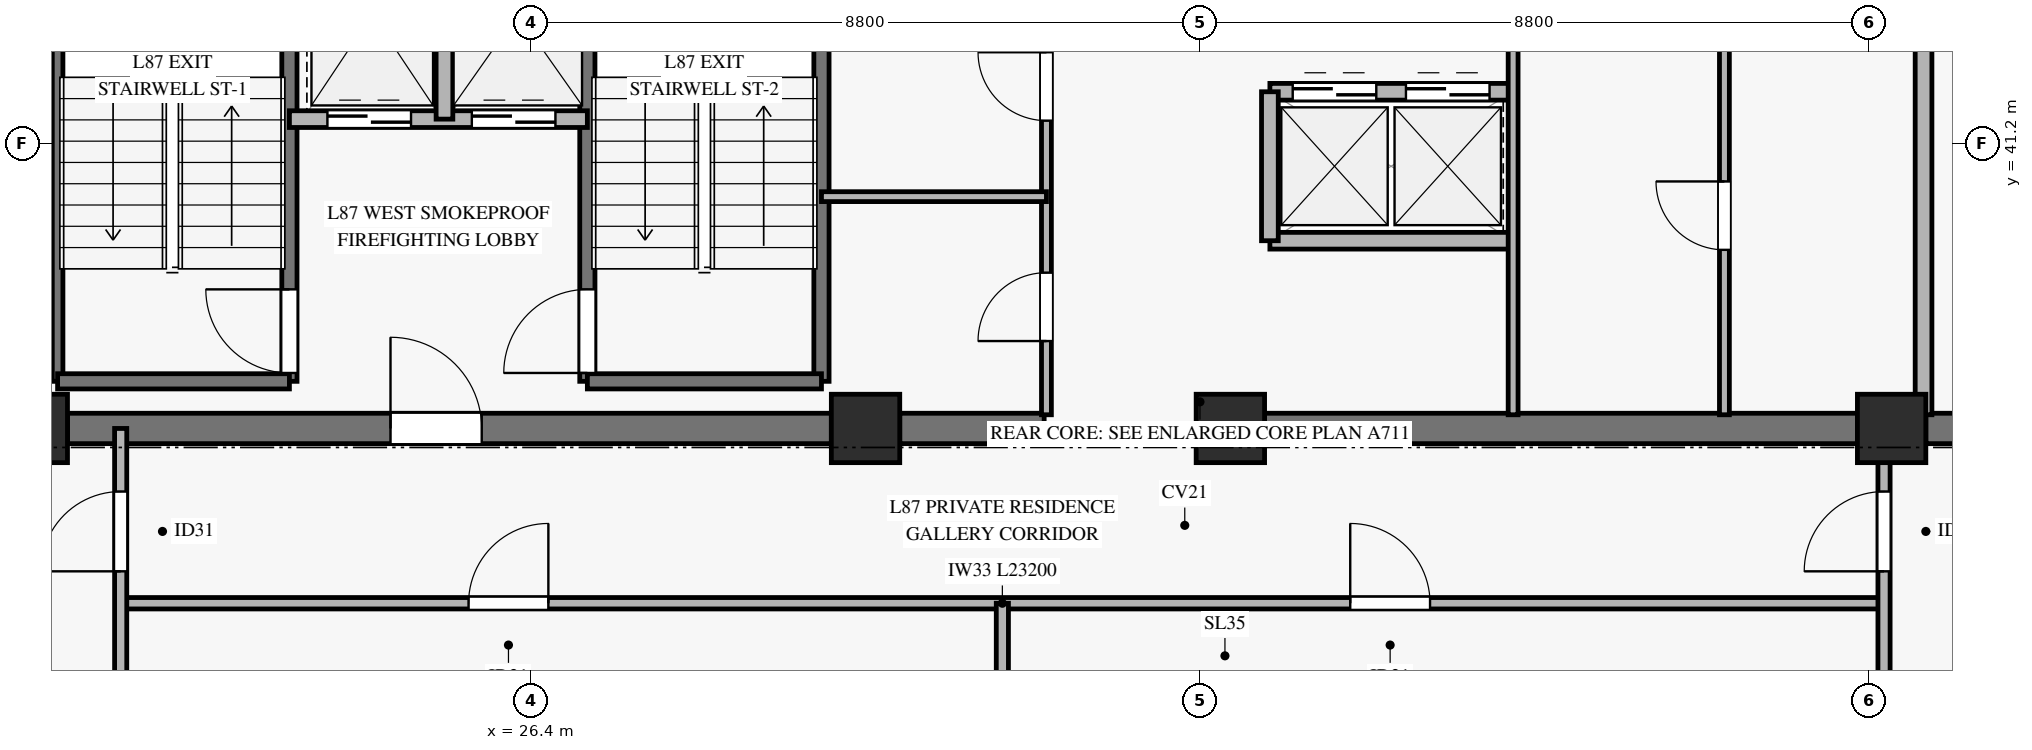
"""IFC4 building model, lengths in metres.
Left out: names, types, materials, properties, quantities, classifications, styles, units other than length and angle.
Written with IfcOpenShell. Run it as: python <this file> out.ifc"""

import sys

from ifc_helpers import new_model, si_unit, direction, frame, frame_2d, origin, origin_2d, place, context, subcontext, project, spatial, rectangle, extrude, source, transform, mapped, element, fill, save


model = new_model("IFC4")
c1 = context("Model", 3, precision=1e-05, world=origin(), true_north=direction((0.0, 1.0)))
c2 = subcontext(c1, "Body", "Model", "MODEL_VIEW")
j1 = project(units=[si_unit("LENGTHUNIT", "METRE"), si_unit("PLANEANGLEUNIT", "RADIAN")], contexts=[c1])
p1 = place(None, origin())
s1 = spatial("IfcSite", under=j1, at=p1, CompositionType="ELEMENT")
p2 = place(p1, origin())
s2 = spatial("IfcBuilding", under=s1, at=p2, CompositionType="ELEMENT")
p3 = place(p2, frame((0.0, 0.0, 335.7)))
s3 = spatial("IfcBuildingStorey", under=s2, at=p3, CompositionType="ELEMENT", Elevation=335.7)
m1 = source(origin(), c2, "Body", "SweptSolid", [
    extrude(rectangle(XDim=0.9, YDim=0.9, at=origin_2d()), origin(), (0.0, 0.0, 1.0), 3.185),
])
for number, where, z_axis, x_axis in (
    (1, (19.85, 37.45, 0.0), (0.0, 0.0, 1.0), (1.0, 0.0, 0.0)),
    (2, (30.8, 37.45, 0.0), (0.0, 0.0, 1.0), (1.0, 0.0, 0.0)),
    (3, (35.6, 37.45, 0.0), (0.0, 0.0, 1.0), (1.0, 0.0, 0.0)),
    (4, (44.3, 37.45, 0.0), (0.0, 0.0, 1.0), (1.0, 0.0, 0.0)),
):
    element("IfcColumn", number, at=place(p3, frame(where, z_axis=z_axis, x_axis=x_axis)), inside=s3, PredefinedType="PILASTER", context=c2, shape_type="MappedRepresentation", body=[
        mapped(m1, transform((0.0, 0.0, 0.0), x_axis=(1.0, 0.0, 0.0), y_axis=(0.0, 1.0, 0.0), z_axis=(0.0, 0.0, 1.0), scale=1.0)),
    ])
p4 = place(p3, frame((20.3, 37.45, 0.0), z_axis=(0.0, 0.0, 1.0), x_axis=(1.0, 0.0, 0.0)))
e5 = element("IfcWall", 5, at=p4, inside=s3, PredefinedType="SHEAR", context=c2, shape_type="SweptSolid", body=[
    extrude(rectangle(XDim=10.05, YDim=0.4, at=frame_2d((5.025, 0.0))), origin(), (0.0, 0.0, 1.0), 3.185),
])
p5 = place(p4, frame((4.25, 0.0, 0.0)))
e6 = element("IfcOpeningElement", 6, at=p5, cuts=e5, PredefinedType="OPENING", context=c2, shape_type="SweptSolid", body=[
    extrude(rectangle(XDim=1.2, YDim=2.15, at=frame_2d((0.6, 1.075))), frame((0.0, 0.21, 0.0), z_axis=(0.0, -1.0, 0.0), x_axis=(1.0, 0.0, 0.0)), (0.0, 0.0, 1.0), 0.42),
])
p6 = place(p3, frame((31.25, 37.45, 0.0), z_axis=(0.0, 0.0, 1.0), x_axis=(1.0, 0.0, 0.0)))
e7 = element("IfcWall", 7, at=p6, inside=s3, PredefinedType="SHEAR", context=c2, shape_type="SweptSolid", body=[
    extrude(rectangle(XDim=1.9, YDim=0.4, at=frame_2d((0.95, 0.0))), origin(), (0.0, 0.0, 1.0), 3.185),
])
p7 = place(p3, frame((36.05, 37.45, 0.0), z_axis=(0.0, 0.0, 1.0), x_axis=(1.0, 0.0, 0.0)))
e8 = element("IfcWall", 8, at=p7, inside=s3, PredefinedType="SHEAR", context=c2, shape_type="SweptSolid", body=[
    extrude(rectangle(XDim=7.8, YDim=0.4, at=frame_2d((3.9, 0.0))), origin(), (0.0, 0.0, 1.0), 3.185),
])
p8 = place(p3, frame((44.75, 37.45, 0.0), z_axis=(0.0, 0.0, 1.0), x_axis=(1.0, 0.0, 0.0)))
e9 = element("IfcWall", 9, at=p8, inside=s3, PredefinedType="SHEAR", context=c2, shape_type="SweptSolid", body=[
    extrude(rectangle(XDim=5.35, YDim=0.4, at=frame_2d((2.675, 0.0))), origin(), (0.0, 0.0, 1.0), 3.185),
])
p9 = place(p8, frame((0.7, 0.0, 0.0)))
e10 = element("IfcOpeningElement", 10, at=p9, cuts=e9, PredefinedType="OPENING", context=c2, shape_type="SweptSolid", body=[
    extrude(rectangle(XDim=1.2, YDim=2.15, at=frame_2d((0.6, 1.075))), frame((0.0, 0.21, 0.0), z_axis=(0.0, -1.0, 0.0), x_axis=(1.0, 0.0, 0.0)), (0.0, 0.0, 1.0), 0.42),
])
p10 = place(p3, frame((20.17, 38.07, 0.0), z_axis=(0.0, 0.0, 1.0), x_axis=(0.0, 1.0, 0.0)))
e11 = element("IfcWall", 11, at=p10, inside=s3, PredefinedType="SOLIDWALL", context=c2, shape_type="SweptSolid", body=[
    extrude(rectangle(XDim=7.25, YDim=0.14, at=frame_2d((3.625, 0.0))), origin(), (0.0, 0.0, 1.0), 3.4),
])
p11 = place(p3, frame((23.22, 38.07, 0.0), z_axis=(0.0, 0.0, 1.0), x_axis=(0.0, 1.0, 0.0)))
e12 = element("IfcWall", 12, at=p11, inside=s3, PredefinedType="SOLIDWALL", context=c2, shape_type="SweptSolid", body=[
    extrude(rectangle(XDim=7.25, YDim=0.2, at=frame_2d((3.625, 0.0))), origin(), (0.0, 0.0, 1.0), 3.4),
])
p12 = place(p11, frame((0.11, 0.0, 0.0)))
e13 = element("IfcOpeningElement", 13, at=p12, cuts=e12, PredefinedType="OPENING", context=c2, shape_type="SweptSolid", body=[
    extrude(rectangle(XDim=1.1, YDim=2.15, at=frame_2d((0.55, 1.075))), frame((0.0, 0.11, 0.0), z_axis=(0.0, -1.0, 0.0), x_axis=(1.0, 0.0, 0.0)), (0.0, 0.0, 1.0), 0.22),
])
p13 = place(p3, frame((20.17, 38.07, 0.0), z_axis=(0.0, 0.0, 1.0), x_axis=(1.0, 0.0, 0.0)))
e14 = element("IfcWall", 14, at=p13, inside=s3, PredefinedType="SOLIDWALL", context=c2, shape_type="SweptSolid", body=[
    extrude(rectangle(XDim=3.05, YDim=0.2, at=frame_2d((1.525, 0.0))), origin(), (0.0, 0.0, 1.0), 3.4),
])
p14 = place(p3, frame((27.14, 38.07, 0.0), z_axis=(0.0, 0.0, 1.0), x_axis=(0.0, 1.0, 0.0)))
e15 = element("IfcWall", 15, at=p14, inside=s3, PredefinedType="SOLIDWALL", context=c2, shape_type="SweptSolid", body=[
    extrude(rectangle(XDim=7.25, YDim=0.2, at=frame_2d((3.625, 0.0))), origin(), (0.0, 0.0, 1.0), 3.4),
])
p15 = place(p14, frame((0.11, 0.0, 0.0)))
e16 = element("IfcOpeningElement", 16, at=p15, cuts=e15, PredefinedType="OPENING", context=c2, shape_type="SweptSolid", body=[
    extrude(rectangle(XDim=1.1, YDim=2.15, at=frame_2d((0.55, 1.075))), frame((0.0, 0.11, 0.0), z_axis=(0.0, -1.0, 0.0), x_axis=(1.0, 0.0, 0.0)), (0.0, 0.0, 1.0), 0.22),
])
p16 = place(p3, frame((30.22, 38.07, 0.0), z_axis=(0.0, 0.0, 1.0), x_axis=(0.0, 1.0, 0.0)))
e17 = element("IfcWall", 17, at=p16, inside=s3, PredefinedType="SOLIDWALL", context=c2, shape_type="SweptSolid", body=[
    extrude(rectangle(XDim=7.25, YDim=0.2, at=frame_2d((3.625, 0.0))), origin(), (0.0, 0.0, 1.0), 3.4),
])
p17 = place(p3, frame((27.14, 38.07, 0.0), z_axis=(0.0, 0.0, 1.0), x_axis=(1.0, 0.0, 0.0)))
e18 = element("IfcWall", 18, at=p17, inside=s3, PredefinedType="SOLIDWALL", context=c2, shape_type="SweptSolid", body=[
    extrude(rectangle(XDim=3.08, YDim=0.2, at=frame_2d((1.54, 0.0))), origin(), (0.0, 0.0, 1.0), 3.4),
])
p18 = place(p3, frame((23.22, 41.52, 0.0), z_axis=(0.0, 0.0, 1.0), x_axis=(1.0, 0.0, 0.0)))
e19 = element("IfcWall", 19, at=p18, inside=s3, PredefinedType="SOLIDWALL", context=c2, shape_type="SweptSolid", body=[
    extrude(rectangle(XDim=3.92, YDim=0.22, at=frame_2d((1.96, 0.0))), origin(), (0.0, 0.0, 1.0), 3.185),
])
p19 = place(p18, frame((0.5, 0.0, 0.0)))
e20 = element("IfcOpeningElement", 20, at=p19, cuts=e19, PredefinedType="OPENING", context=c2, shape_type="SweptSolid", body=[
    extrude(rectangle(XDim=1.1, YDim=2.2, at=frame_2d((0.55, 1.1))), frame((0.0, 0.12, 0.0), z_axis=(0.0, -1.0, 0.0), x_axis=(1.0, 0.0, 0.0)), (0.0, 0.0, 1.0), 0.24),
])
p20 = place(p18, frame((2.4, 0.0, 0.0)))
e21 = element("IfcOpeningElement", 21, at=p20, cuts=e19, PredefinedType="OPENING", context=c2, shape_type="SweptSolid", body=[
    extrude(rectangle(XDim=1.1, YDim=2.2, at=frame_2d((0.55, 1.1))), frame((0.0, 0.12, 0.0), z_axis=(0.0, -1.0, 0.0), x_axis=(1.0, 0.0, 0.0)), (0.0, 0.0, 1.0), 0.24),
])
p21 = place(p3, frame((25.26, 41.52, 0.0), z_axis=(0.0, 0.0, 1.0), x_axis=(0.0, 1.0, 0.0)))
e22 = element("IfcWall", 22, at=p21, inside=s3, PredefinedType="SOLIDWALL", context=c2, shape_type="SweptSolid", body=[
    extrude(rectangle(XDim=2.8, YDim=0.22, at=frame_2d((1.4, 0.0))), origin(), (0.0, 0.0, 1.0), 3.185),
])
p22 = place(p3, frame((44.72, 37.63, 0.0), z_axis=(0.0, 0.0, 1.0), x_axis=(0.0, 1.0, 0.0)))
e23 = element("IfcWall", 23, at=p22, inside=s3, PredefinedType="SOLIDWALL", context=c2, shape_type="SweptSolid", body=[
    extrude(rectangle(XDim=7.59, YDim=0.22, at=frame_2d((3.795, 0.0))), origin(), (0.0, 0.0, 1.0), 3.185),
])
p23 = place(p3, frame((36.12, 41.88, 0.0), z_axis=(0.0, 0.0, 1.0), x_axis=(1.0, 0.0, 0.0)))
e24 = element("IfcWall", 24, at=p23, inside=s3, PredefinedType="SOLIDWALL", context=c2, shape_type="SweptSolid", body=[
    extrude(rectangle(XDim=3.2, YDim=0.22, at=frame_2d((1.6, 0.0))), origin(), (0.0, 0.0, 1.0), 3.185),
])
p24 = place(p23, frame((0.3, 0.0, 0.0)))
e25 = element("IfcOpeningElement", 25, at=p24, cuts=e24, PredefinedType="OPENING", context=c2, shape_type="SweptSolid", body=[
    extrude(rectangle(XDim=1.1, YDim=2.2, at=frame_2d((0.55, 1.1))), frame((0.0, 0.12, 0.0), z_axis=(0.0, -1.0, 0.0), x_axis=(1.0, 0.0, 0.0)), (0.0, 0.0, 1.0), 0.24),
])
p25 = place(p23, frame((1.79, 0.0, 0.0)))
e26 = element("IfcOpeningElement", 26, at=p25, cuts=e24, PredefinedType="OPENING", context=c2, shape_type="SweptSolid", body=[
    extrude(rectangle(XDim=1.1, YDim=2.2, at=frame_2d((0.55, 1.1))), frame((0.0, 0.12, 0.0), z_axis=(0.0, -1.0, 0.0), x_axis=(1.0, 0.0, 0.0)), (0.0, 0.0, 1.0), 0.24),
])
p26 = place(p3, frame((36.12, 39.92, 0.0), z_axis=(0.0, 0.0, 1.0), x_axis=(1.0, 0.0, 0.0)))
e27 = element("IfcWall", 27, at=p26, inside=s3, PredefinedType="SOLIDWALL", context=c2, shape_type="SweptSolid", body=[
    extrude(rectangle(XDim=3.2, YDim=0.22, at=frame_2d((1.6, 0.0))), origin(), (0.0, 0.0, 1.0), 3.185),
])
p27 = place(p3, frame((36.12, 39.92, 0.0), z_axis=(0.0, 0.0, 1.0), x_axis=(0.0, 1.0, 0.0)))
e28 = element("IfcWall", 28, at=p27, inside=s3, PredefinedType="SOLIDWALL", context=c2, shape_type="SweptSolid", body=[
    extrude(rectangle(XDim=1.96, YDim=0.22, at=frame_2d((0.98, 0.0))), origin(), (0.0, 0.0, 1.0), 3.185),
])
p28 = place(p3, frame((33.18, 37.63, 0.0), z_axis=(0.0, 0.0, 1.0), x_axis=(0.0, 1.0, 0.0)))
e29 = element("IfcWall", 29, at=p28, inside=s3, PredefinedType="PARTITIONING", context=c2, shape_type="SweptSolid", body=[
    extrude(rectangle(XDim=6.52, YDim=0.13, at=frame_2d((3.26, 0.0))), origin(), (0.0, 0.0, 1.0), 2.27),
])
p29 = place(p28, frame((0.97, 0.0, 0.0)))
e30 = element("IfcOpeningElement", 30, at=p29, cuts=e29, PredefinedType="OPENING", context=c2, shape_type="SweptSolid", body=[
    extrude(rectangle(XDim=0.9, YDim=2.1, at=frame_2d((0.45, 1.05))), frame((0.0, 0.075, 0.0), z_axis=(0.0, -1.0, 0.0), x_axis=(1.0, 0.0, 0.0)), (0.0, 0.0, 1.0), 0.15),
])
p30 = place(p28, frame((3.87, 0.0, 0.0)))
e31 = element("IfcOpeningElement", 31, at=p30, cuts=e29, PredefinedType="OPENING", context=c2, shape_type="SweptSolid", body=[
    extrude(rectangle(XDim=0.9, YDim=2.1, at=frame_2d((0.45, 1.05))), frame((0.0, 0.075, 0.0), z_axis=(0.0, -1.0, 0.0), x_axis=(1.0, 0.0, 0.0)), (0.0, 0.0, 1.0), 0.15),
])
p31 = place(p3, frame((39.32, 37.63, 0.0), z_axis=(0.0, 0.0, 1.0), x_axis=(0.0, 1.0, 0.0)))
e32 = element("IfcWall", 32, at=p31, inside=s3, PredefinedType="PARTITIONING", context=c2, shape_type="SweptSolid", body=[
    extrude(rectangle(XDim=8.74, YDim=0.13, at=frame_2d((4.37, 0.0))), origin(), (0.0, 0.0, 1.0), 3.185),
])
p32 = place(p31, frame((4.89, 0.0, 0.0)))
e33 = element("IfcOpeningElement", 33, at=p32, cuts=e32, PredefinedType="OPENING", context=c2, shape_type="SweptSolid", body=[
    extrude(rectangle(XDim=0.9, YDim=2.1, at=frame_2d((0.45, 1.05))), frame((0.0, 0.075, 0.0), z_axis=(0.0, -1.0, 0.0), x_axis=(1.0, 0.0, 0.0)), (0.0, 0.0, 1.0), 0.15),
])
p33 = place(p3, frame((30.22, 40.5, 0.0), z_axis=(0.0, 0.0, 1.0), x_axis=(1.0, 0.0, 0.0)))
e34 = element("IfcWall", 34, at=p33, inside=s3, PredefinedType="PARTITIONING", context=c2, shape_type="SweptSolid", body=[
    extrude(rectangle(XDim=2.96, YDim=0.13, at=frame_2d((1.48, 0.0))), origin(), (0.0, 0.0, 1.0), 2.47),
])
p34 = place(p3, frame((42.1, 37.63, 0.0), z_axis=(0.0, 0.0, 1.0), x_axis=(0.0, 1.0, 0.0)))
e35 = element("IfcWall", 35, at=p34, inside=s3, PredefinedType="PARTITIONING", context=c2, shape_type="SweptSolid", body=[
    extrude(rectangle(XDim=8.74, YDim=0.13, at=frame_2d((4.37, 0.0))), origin(), (0.0, 0.0, 1.0), 3.185),
])
p35 = place(p34, frame((2.17, 0.0, 0.0)))
e36 = element("IfcOpeningElement", 36, at=p35, cuts=e35, PredefinedType="OPENING", context=c2, shape_type="SweptSolid", body=[
    extrude(rectangle(XDim=0.9, YDim=2.1, at=frame_2d((0.45, 1.05))), frame((0.0, 0.075, 0.0), z_axis=(0.0, -1.0, 0.0), x_axis=(1.0, 0.0, 0.0)), (0.0, 0.0, 1.0), 0.15),
])
p36 = place(p3, frame((21.0, 35.15, 0.0), z_axis=(0.0, 0.0, 1.0), x_axis=(1.0, 0.0, 0.0)))
e37 = element("IfcWall", 37, at=p36, inside=s3, PredefinedType="PARTITIONING", context=c2, shape_type="SweptSolid", body=[
    extrude(rectangle(XDim=23.2, YDim=0.15, at=frame_2d((11.6, 0.0))), origin(), (0.0, 0.0, 1.0), 2.47),
])
p37 = place(p36, frame((4.577, 0.0, 0.0)))
e38 = element("IfcOpeningElement", 38, at=p37, cuts=e37, PredefinedType="OPENING", context=c2, shape_type="SweptSolid", body=[
    extrude(rectangle(XDim=1.05, YDim=2.15, at=frame_2d((0.525, 1.075))), frame((0.0, 0.085, 0.0), z_axis=(0.0, -1.0, 0.0), x_axis=(1.0, 0.0, 0.0)), (0.0, 0.0, 1.0), 0.17),
])
p38 = place(p36, frame((16.177, 0.0, 0.0)))
e39 = element("IfcOpeningElement", 39, at=p38, cuts=e37, PredefinedType="OPENING", context=c2, shape_type="SweptSolid", body=[
    extrude(rectangle(XDim=1.05, YDim=2.15, at=frame_2d((0.525, 1.075))), frame((0.0, 0.085, 0.0), z_axis=(0.0, -1.0, 0.0), x_axis=(1.0, 0.0, 0.0)), (0.0, 0.0, 1.0), 0.17),
])
p39 = place(p3, frame((21.0, 22.568, 0.0), z_axis=(0.0, 0.0, 1.0), x_axis=(0.0, 1.0, 0.0)))
e40 = element("IfcWall", 40, at=p39, inside=s3, PredefinedType="PARTITIONING", context=c2, shape_type="SweptSolid", body=[
    extrude(rectangle(XDim=14.882, YDim=0.16, at=frame_2d((7.441, 0.0))), origin(), (0.0, 0.0, 1.0), 2.77),
])
p40 = place(p39, frame((13.002, 0.0, 0.0)))
e41 = element("IfcOpeningElement", 41, at=p40, cuts=e40, PredefinedType="OPENING", context=c2, shape_type="SweptSolid", body=[
    extrude(rectangle(XDim=1.05, YDim=2.15, at=frame_2d((0.525, 1.075))), frame((0.0, 0.09, 0.0), z_axis=(0.0, -1.0, 0.0), x_axis=(1.0, 0.0, 0.0)), (0.0, 0.0, 1.0), 0.18),
])
p41 = place(p3, frame((32.6, 22.568, 0.0), z_axis=(0.0, 0.0, 1.0), x_axis=(0.0, 1.0, 0.0)))
e42 = element("IfcWall", 42, at=p41, inside=s3, PredefinedType="PARTITIONING", context=c2, shape_type="SweptSolid", body=[
    extrude(rectangle(XDim=12.582, YDim=0.16, at=frame_2d((6.291, 0.0))), origin(), (0.0, 0.0, 1.0), 2.77),
])
p42 = place(p3, frame((44.2, 22.568, 0.0), z_axis=(0.0, 0.0, 1.0), x_axis=(0.0, 1.0, 0.0)))
e43 = element("IfcWall", 43, at=p42, inside=s3, PredefinedType="PARTITIONING", context=c2, shape_type="SweptSolid", body=[
    extrude(rectangle(XDim=14.882, YDim=0.16, at=frame_2d((7.441, 0.0))), origin(), (0.0, 0.0, 1.0), 2.47),
])
p43 = place(p42, frame((13.002, 0.0, 0.0)))
e44 = element("IfcOpeningElement", 44, at=p43, cuts=e43, PredefinedType="OPENING", context=c2, shape_type="SweptSolid", body=[
    extrude(rectangle(XDim=1.05, YDim=2.15, at=frame_2d((0.525, 1.075))), frame((0.0, 0.09, 0.0), z_axis=(0.0, -1.0, 0.0), x_axis=(1.0, 0.0, 0.0)), (0.0, 0.0, 1.0), 0.18),
])
m2 = source(origin(), c2, "Body", "SweptSolid", [
    extrude(rectangle(XDim=1.1, YDim=2.15, at=frame_2d((0.55, 1.075))), frame((0.0, 0.025, 0.0), z_axis=(0.0, -1.0, 0.0), x_axis=(1.0, 0.0, 0.0)), (0.0, 0.0, 1.0), 0.05),
])
p44 = place(p12, origin())
e45 = element("IfcDoor", 45, at=p44, inside=s3, OperationType="SINGLE_SWING_RIGHT", PredefinedType="DOOR", context=c2, shape_type="MappedRepresentation", body=[
    mapped(m2, transform((0.0, 0.0, 0.0), x_axis=(1.0, 0.0, 0.0), y_axis=(0.0, 1.0, 0.0), z_axis=(0.0, 0.0, 1.0), scale=1.0)),
])
fill(e13, e45)
p45 = place(p15, origin())
e46 = element("IfcDoor", 46, at=p45, inside=s3, OperationType="SINGLE_SWING_LEFT", PredefinedType="DOOR", context=c2, shape_type="MappedRepresentation", body=[
    mapped(m2, transform((0.0, 0.0, 0.0), x_axis=(1.0, 0.0, 0.0), y_axis=(0.0, 1.0, 0.0), z_axis=(0.0, 0.0, 1.0), scale=1.0)),
])
fill(e16, e46)
m3 = source(origin(), c2, "Body", "SweptSolid", [
    extrude(rectangle(XDim=1.1, YDim=2.2, at=frame_2d((0.55, 1.1))), frame((0.0, 0.025, 0.0), z_axis=(0.0, -1.0, 0.0), x_axis=(1.0, 0.0, 0.0)), (0.0, 0.0, 1.0), 0.05),
])
p46 = place(p19, origin())
e47 = element("IfcDoor", 47, at=p46, inside=s3, OperationType="SLIDING_TO_LEFT", PredefinedType="DOOR", context=c2, shape_type="MappedRepresentation", body=[
    mapped(m3, transform((0.0, 0.0, 0.0), x_axis=(1.0, 0.0, 0.0), y_axis=(0.0, 1.0, 0.0), z_axis=(0.0, 0.0, 1.0), scale=1.0)),
])
fill(e20, e47)
p47 = place(p20, origin())
e48 = element("IfcDoor", 48, at=p47, inside=s3, OperationType="SLIDING_TO_LEFT", PredefinedType="DOOR", context=c2, shape_type="MappedRepresentation", body=[
    mapped(m3, transform((0.0, 0.0, 0.0), x_axis=(1.0, 0.0, 0.0), y_axis=(0.0, 1.0, 0.0), z_axis=(0.0, 0.0, 1.0), scale=1.0)),
])
fill(e21, e48)
m4 = source(origin(), c2, "Body", "SweptSolid", [
    extrude(rectangle(XDim=1.2, YDim=2.15, at=frame_2d((0.6, 1.075))), frame((0.0, 0.025, 0.0), z_axis=(0.0, -1.0, 0.0), x_axis=(1.0, 0.0, 0.0)), (0.0, 0.0, 1.0), 0.05),
])
p48 = place(p5, origin())
e49 = element("IfcDoor", 49, at=p48, inside=s3, OperationType="SINGLE_SWING_LEFT", PredefinedType="DOOR", context=c2, shape_type="MappedRepresentation", body=[
    mapped(m4, transform((0.0, 0.0, 0.0), x_axis=(1.0, 0.0, 0.0), y_axis=(0.0, 1.0, 0.0), z_axis=(0.0, 0.0, 1.0), scale=1.0)),
])
fill(e6, e49)
p49 = place(p24, origin())
e50 = element("IfcDoor", 50, at=p49, inside=s3, OperationType="SLIDING_TO_LEFT", PredefinedType="DOOR", context=c2, shape_type="MappedRepresentation", body=[
    mapped(m3, transform((0.0, 0.0, 0.0), x_axis=(1.0, 0.0, 0.0), y_axis=(0.0, 1.0, 0.0), z_axis=(0.0, 0.0, 1.0), scale=1.0)),
])
fill(e25, e50)
p50 = place(p25, origin())
e51 = element("IfcDoor", 51, at=p50, inside=s3, OperationType="SLIDING_TO_LEFT", PredefinedType="DOOR", context=c2, shape_type="MappedRepresentation", body=[
    mapped(m3, transform((0.0, 0.0, 0.0), x_axis=(1.0, 0.0, 0.0), y_axis=(0.0, 1.0, 0.0), z_axis=(0.0, 0.0, 1.0), scale=1.0)),
])
fill(e26, e51)
m5 = source(origin(), c2, "Body", "SweptSolid", [
    extrude(rectangle(XDim=0.9, YDim=2.1, at=frame_2d((0.45, 1.05))), frame((0.0, 0.025, 0.0), z_axis=(0.0, -1.0, 0.0), x_axis=(1.0, 0.0, 0.0)), (0.0, 0.0, 1.0), 0.05),
])
p51 = place(p29, origin())
e52 = element("IfcDoor", 52, at=p51, inside=s3, OperationType="SINGLE_SWING_LEFT", PredefinedType="DOOR", context=c2, shape_type="MappedRepresentation", body=[
    mapped(m5, transform((0.0, 0.0, 0.0), x_axis=(1.0, 0.0, 0.0), y_axis=(0.0, 1.0, 0.0), z_axis=(0.0, 0.0, 1.0), scale=1.0)),
])
fill(e30, e52)
p52 = place(p30, origin())
e53 = element("IfcDoor", 53, at=p52, inside=s3, OperationType="SINGLE_SWING_RIGHT", PredefinedType="DOOR", context=c2, shape_type="MappedRepresentation", body=[
    mapped(m5, transform((0.0, 0.0, 0.0), x_axis=(1.0, 0.0, 0.0), y_axis=(0.0, 1.0, 0.0), z_axis=(0.0, 0.0, 1.0), scale=1.0)),
])
fill(e31, e53)
p53 = place(p35, origin())
e54 = element("IfcDoor", 54, at=p53, inside=s3, OperationType="SINGLE_SWING_RIGHT", PredefinedType="DOOR", context=c2, shape_type="MappedRepresentation", body=[
    mapped(m5, transform((0.0, 0.0, 0.0), x_axis=(1.0, 0.0, 0.0), y_axis=(0.0, 1.0, 0.0), z_axis=(0.0, 0.0, 1.0), scale=1.0)),
])
fill(e36, e54)
m6 = source(origin(), c2, "Body", "SweptSolid", [
    extrude(rectangle(XDim=1.05, YDim=2.15, at=frame_2d((0.525, 1.075))), frame((0.0, 0.025, 0.0), z_axis=(0.0, -1.0, 0.0), x_axis=(1.0, 0.0, 0.0)), (0.0, 0.0, 1.0), 0.05),
])
p54 = place(p40, origin())
e55 = element("IfcDoor", 55, at=p54, inside=s3, OperationType="SINGLE_SWING_LEFT", PredefinedType="DOOR", context=c2, shape_type="MappedRepresentation", body=[
    mapped(m6, transform((0.0, 0.0, 0.0), x_axis=(1.0, 0.0, 0.0), y_axis=(0.0, 1.0, 0.0), z_axis=(0.0, 0.0, 1.0), scale=1.0)),
])
fill(e41, e55)
p55 = place(p37, origin())
e56 = element("IfcDoor", 56, at=p55, inside=s3, OperationType="SINGLE_SWING_RIGHT", PredefinedType="DOOR", context=c2, shape_type="MappedRepresentation", body=[
    mapped(m6, transform((0.0, 0.0, 0.0), x_axis=(1.0, 0.0, 0.0), y_axis=(0.0, 1.0, 0.0), z_axis=(0.0, 0.0, 1.0), scale=1.0)),
])
fill(e38, e56)
p56 = place(p38, origin())
e57 = element("IfcDoor", 57, at=p56, inside=s3, OperationType="SINGLE_SWING_LEFT", PredefinedType="DOOR", context=c2, shape_type="MappedRepresentation", body=[
    mapped(m6, transform((0.0, 0.0, 0.0), x_axis=(1.0, 0.0, 0.0), y_axis=(0.0, 1.0, 0.0), z_axis=(0.0, 0.0, 1.0), scale=1.0)),
])
fill(e39, e57)
p57 = place(p43, origin())
e58 = element("IfcDoor", 58, at=p57, inside=s3, OperationType="SINGLE_SWING_LEFT", PredefinedType="DOOR", context=c2, shape_type="MappedRepresentation", body=[
    mapped(m6, transform((0.0, 0.0, 0.0), x_axis=(1.0, 0.0, 0.0), y_axis=(0.0, 1.0, 0.0), z_axis=(0.0, 0.0, 1.0), scale=1.0)),
])
fill(e44, e58)
save(model, sys.argv[1])
